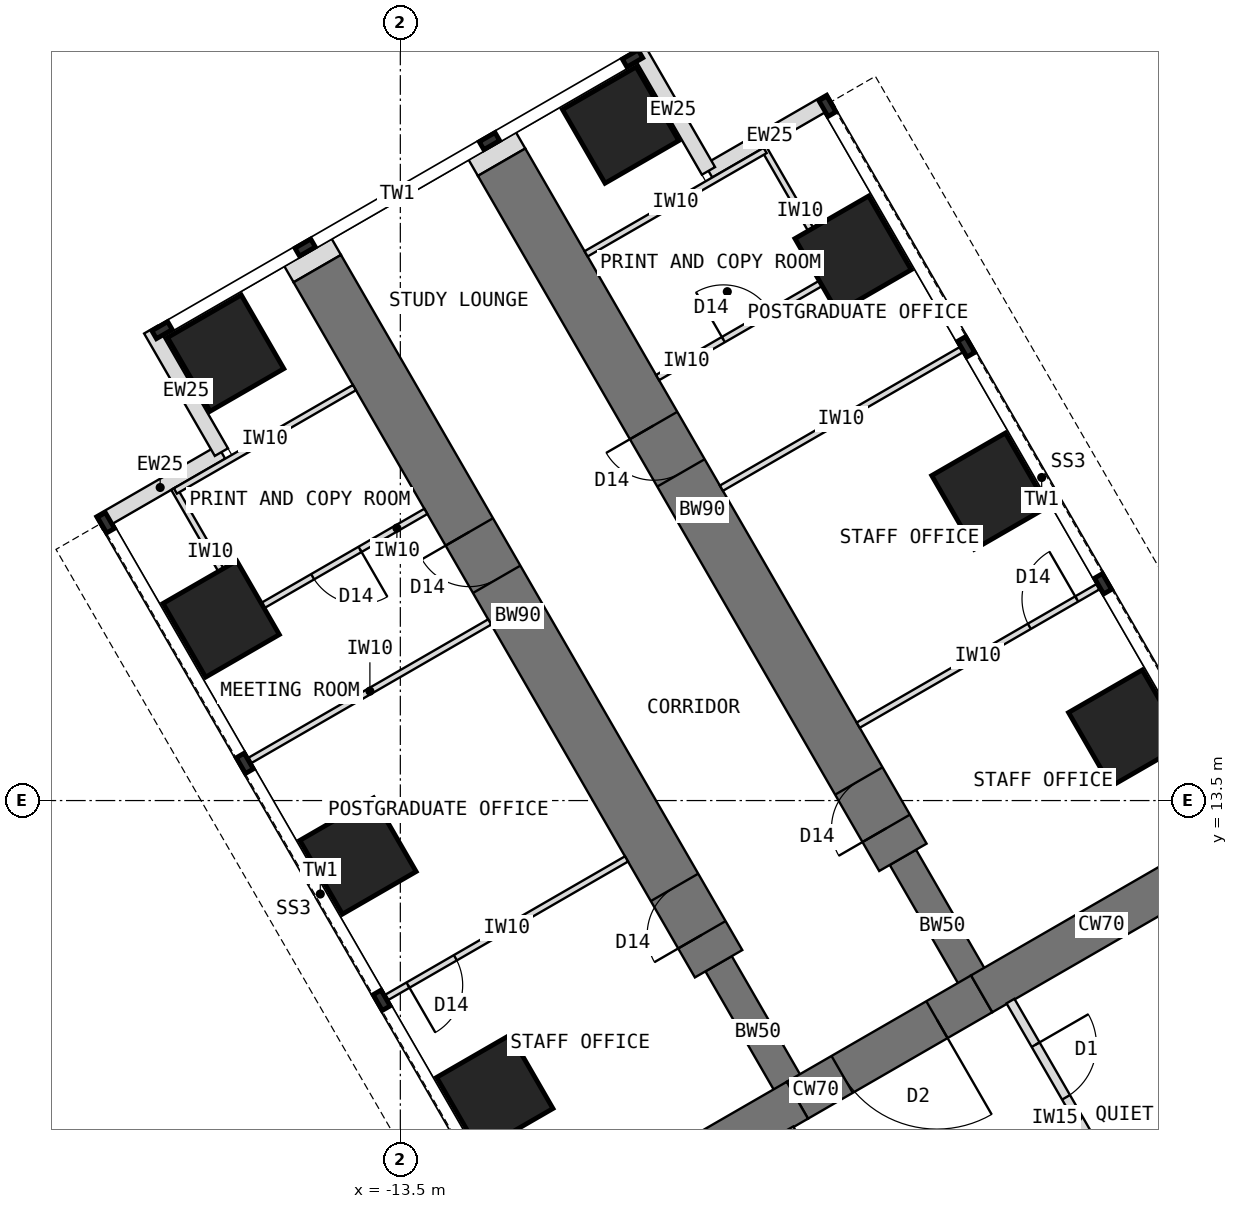
"""IFC4 building model, lengths in metres.
Left out: names, types, materials, properties, quantities, classifications, styles, units other than length and angle.
Written with IfcOpenShell. Run it as: python <this file> out.ifc"""

import sys

from ifc_helpers import new_model, si_unit, direction, frame, frame_2d, origin, origin_2d, place, context, subcontext, project, spatial, rectangle, extrude, element, fill, save


model = new_model("IFC4")
c1 = context("Model", 3, precision=1e-05, world=origin(), true_north=direction((0.0, 1.0)))
c2 = subcontext(c1, "Body", "Model", "MODEL_VIEW")
j1 = project(units=[si_unit("LENGTHUNIT", "METRE"), si_unit("PLANEANGLEUNIT", "RADIAN")], contexts=[c1])
p1 = place(None, origin())
s1 = spatial("IfcSite", under=j1, at=p1, CompositionType="ELEMENT")
p2 = place(p1, origin())
s2 = spatial("IfcBuilding", under=s1, at=p2, CompositionType="ELEMENT")
p3 = place(p2, frame((0.0, 0.0, 88.5)))
s3 = spatial("IfcBuildingStorey", under=s2, at=p3, CompositionType="ELEMENT", Elevation=88.5)
p4 = place(p3, frame((0.0, 12.596, 0.0), z_axis=(0.0, 0.0, 1.0), x_axis=(-0.866011268655, -0.500024481964, 0.0)))
e1 = element("IfcWall", 1, at=p4, inside=s3, PredefinedType="SHEAR", context=c2, shape_type="SweptSolid", body=[
    extrude(rectangle(XDim=4.548, YDim=0.7, at=frame_2d((2.274, 0.0))), origin(), (0.0, 0.0, 1.0), 4.0),
])
p5 = place(p3, frame((-3.939, 10.322, 0.0), z_axis=(0.0, 0.0, 1.0), x_axis=(-0.866019471182, -0.500010275428, 0.0)))
e2 = element("IfcWall", 2, at=p5, inside=s3, PredefinedType="SHEAR", context=c2, shape_type="SweptSolid", body=[
    extrude(rectangle(XDim=3.5, YDim=0.7, at=frame_2d((1.75, 0.0))), origin(), (0.0, 0.0, 1.0), 4.0),
])
p6 = place(p5, frame((0.85, 0.0, 0.0)))
e3 = element("IfcOpeningElement", 3, at=p6, cuts=e2, PredefinedType="OPENING", context=c2, shape_type="SweptSolid", body=[
    extrude(rectangle(XDim=1.8, YDim=2.1, at=frame_2d((0.9, 1.05))), frame((0.0, 0.36, 0.0), z_axis=(0.0, -1.0, 0.0), x_axis=(1.0, 0.0, 0.0)), (0.0, 0.0, 1.0), 0.72),
])
p7 = place(p3, frame((-6.97, 8.572, 0.0), z_axis=(0.0, 0.0, 1.0), x_axis=(-0.866034513004, -0.499984222037, 0.0)))
e4 = element("IfcWall", 4, at=p7, inside=s3, PredefinedType="SHEAR", context=c2, shape_type="SweptSolid", body=[
    extrude(rectangle(XDim=4.548, YDim=0.7, at=frame_2d((2.274, 0.0))), origin(), (0.0, 0.0, 1.0), 4.0),
])
p8 = place(p3, frame((-6.97, 8.572, 0.0), z_axis=(0.0, 0.0, 1.0), x_axis=(-0.499988811324, 0.866031863473, 0.0)))
e5 = element("IfcWall", 5, at=p8, inside=s3, PredefinedType="SHEAR", context=c2, shape_type="SweptSolid", body=[
    extrude(rectangle(XDim=2.592, YDim=0.5, at=frame_2d((1.296, 0.0))), origin(), (0.0, 0.0, 1.0), 4.0),
])
p9 = place(p3, frame((-8.266, 10.816, 0.0), z_axis=(0.0, 0.0, 1.0), x_axis=(-0.499996231654, 0.866027579429, 0.0)))
e6 = element("IfcWall", 6, at=p9, inside=s3, PredefinedType="SHEAR", context=c2, shape_type="SweptSolid", body=[
    extrude(rectangle(XDim=13.2, YDim=0.9, at=frame_2d((6.6, 0.0))), origin(), (0.0, 0.0, 1.0), 4.0),
])
p10 = place(p9, frame((0.55, 0.0, 0.0)))
e7 = element("IfcOpeningElement", 7, at=p10, cuts=e6, PredefinedType="OPENING", context=c2, shape_type="SweptSolid", body=[
    extrude(rectangle(XDim=0.9, YDim=2.1, at=frame_2d((0.45, 1.05))), frame((0.0, 0.46, 0.0), z_axis=(0.0, -1.0, 0.0), x_axis=(1.0, 0.0, 0.0)), (0.0, 0.0, 1.0), 0.92),
])
p11 = place(p9, frame((7.3, 0.0, 0.0)))
e8 = element("IfcOpeningElement", 8, at=p11, cuts=e6, PredefinedType="OPENING", context=c2, shape_type="SweptSolid", body=[
    extrude(rectangle(XDim=0.9, YDim=2.1, at=frame_2d((0.45, 1.05))), frame((0.0, 0.46, 0.0), z_axis=(0.0, -1.0, 0.0), x_axis=(1.0, 0.0, 0.0)), (0.0, 0.0, 1.0), 0.92),
])
p12 = place(p3, frame((-3.939, 10.322, 0.0), z_axis=(0.0, 0.0, 1.0), x_axis=(-0.499918158782, 0.866072649678, 0.0)))
e9 = element("IfcWall", 9, at=p12, inside=s3, PredefinedType="SHEAR", context=c2, shape_type="SweptSolid", body=[
    extrude(rectangle(XDim=2.592, YDim=0.5, at=frame_2d((1.296, 0.0))), origin(), (0.0, 0.0, 1.0), 4.0),
])
p13 = place(p3, frame((-5.234, 12.566, 0.0), z_axis=(0.0, 0.0, 1.0), x_axis=(-0.500010103361, 0.866019570528, 0.0)))
e10 = element("IfcWall", 10, at=p13, inside=s3, PredefinedType="SHEAR", context=c2, shape_type="SweptSolid", body=[
    extrude(rectangle(XDim=13.2, YDim=0.9, at=frame_2d((6.6, 0.0))), origin(), (0.0, 0.0, 1.0), 4.0),
])
p14 = place(p13, frame((0.55, 0.0, 0.0)))
e11 = element("IfcOpeningElement", 11, at=p14, cuts=e10, PredefinedType="OPENING", context=c2, shape_type="SweptSolid", body=[
    extrude(rectangle(XDim=0.9, YDim=2.1, at=frame_2d((0.45, 1.05))), frame((0.0, 0.46, 0.0), z_axis=(0.0, -1.0, 0.0), x_axis=(1.0, 0.0, 0.0)), (0.0, 0.0, 1.0), 0.92),
])
p15 = place(p13, frame((7.3, 0.0, 0.0)))
e12 = element("IfcOpeningElement", 12, at=p15, cuts=e10, PredefinedType="OPENING", context=c2, shape_type="SweptSolid", body=[
    extrude(rectangle(XDim=0.9, YDim=2.1, at=frame_2d((0.45, 1.05))), frame((0.0, 0.46, 0.0), z_axis=(0.0, -1.0, 0.0), x_axis=(1.0, 0.0, 0.0)), (0.0, 0.0, 1.0), 0.92),
])
for number, where, z_axis, x_axis in (
    (13, (-11.946, 8.691, 0.0), (0.0, 0.0, 1.0), (0.866, 0.5, 0.0)),
    (14, (-1.554, 14.691, 0.0), (0.0, 0.0, 1.0), (0.866, 0.5, 0.0)),
    (15, (-14.196, 12.588, 0.0), (0.0, 0.0, 1.0), (0.866, 0.5, 0.0)),
    (16, (-3.804, 18.588, 0.0), (0.0, 0.0, 1.0), (0.866, 0.5, 0.0)),
    (17, (-16.446, 16.486, 0.0), (0.0, 0.0, 1.0), (0.866, 0.5, 0.0)),
    (18, (-6.054, 22.486, 0.0), (0.0, 0.0, 1.0), (0.866, 0.5, 0.0)),
    (19, (-16.373, 20.858, 0.0), (0.0, 0.0, 1.0), (0.866, 0.5, 0.0)),
    (20, (-9.877, 24.608, 0.0), (0.0, 0.0, 1.0), (0.866, 0.5, 0.0)),
):
    element("IfcColumn", number, at=place(p3, frame(where, z_axis=z_axis, x_axis=x_axis)), inside=s3, PredefinedType="COLUMN", context=c2, shape_type="SweptSolid", body=[
        extrude(rectangle(XDim=1.4, YDim=1.4, at=origin_2d()), origin(), (0.0, 0.0, 1.0), 4.0),
    ])
for number, where, z_axis, x_axis in (
    (21, (-18.456, 18.067, 0.0), (0.0, 0.0, 1.0), (0.866, 0.5, 0.0)),
    (22, (-16.443, 19.23, 0.0), (0.0, 0.0, 1.0), (-0.5, 0.866, 0.0)),
    (23, (-6.419, 25.017, 0.0), (0.0, 0.0, 1.0), (-0.866, -0.5, 0.0)),
    (24, (-8.432, 23.855, 0.0), (0.0, 0.0, 1.0), (-0.5, 0.866, 0.0)),
):
    element("IfcWall", number, at=place(p3, frame(where, z_axis=z_axis, x_axis=x_axis)), inside=s3, PredefinedType="STANDARD", context=c2, shape_type="SweptSolid", body=[
        extrude(rectangle(XDim=2.325, YDim=0.25, at=frame_2d((1.163, 0.0))), origin(), (0.0, 0.0, 1.0), 3.7),
    ])
for number, where, z_axis, x_axis in (
    (25, (-14.865, 22.248, 0.0), (0.0, 0.0, 1.0), (-0.5, 0.866, 0.0)),
    (26, (-11.834, 23.998, 0.0), (0.0, 0.0, 1.0), (-0.5, 0.866, 0.0)),
):
    element("IfcWall", number, at=place(p3, frame(where, z_axis=z_axis, x_axis=x_axis)), inside=s3, PredefinedType="PARTITIONING", context=c2, shape_type="SweptSolid", body=[
        extrude(rectangle(XDim=0.31, YDim=0.9, at=frame_2d((0.155, 0.0))), origin(), (0.0, 0.0, 1.0), 3.7),
    ])
p16 = place(p3, frame((-1.201, 6.12, 0.0), z_axis=(0.0, 0.0, 1.0), x_axis=(0.500002627198, 0.866023886965, 0.0)))
e27 = element("IfcWall", 27, at=p16, inside=s3, PredefinedType="SHEAR", context=c2, shape_type="SweptSolid", body=[
    extrude(rectangle(XDim=5.858, YDim=0.4, at=frame_2d((2.929, 0.0))), origin(), (0.0, 0.0, 1.0), 4.0),
])
p17 = place(p3, frame((-9.78, 12.54, 0.0), z_axis=(0.0, 0.0, 1.0), x_axis=(-0.866035472144, -0.499982560684, 0.0)))
e28 = element("IfcWall", 28, at=p17, inside=s3, PredefinedType="PARTITIONING", context=c2, shape_type="SweptSolid", body=[
    extrude(rectangle(XDim=4.55, YDim=0.1, at=frame_2d((2.275, 0.0))), origin(), (0.0, 0.0, 1.0), 3.7),
])
p18 = place(p17, frame((3.25, 0.0, 0.0)))
e29 = element("IfcOpeningElement", 29, at=p18, cuts=e28, PredefinedType="OPENING", context=c2, shape_type="SweptSolid", body=[
    extrude(rectangle(XDim=0.9, YDim=2.1, at=frame_2d((0.45, 1.05))), frame((0.0, 0.06, 0.0), z_axis=(0.0, -1.0, 0.0), x_axis=(1.0, 0.0, 0.0)), (0.0, 0.0, 1.0), 0.12),
])
p19 = place(p3, frame((-12.03, 16.437, 0.0), z_axis=(0.0, 0.0, 1.0), x_axis=(-0.866035472144, -0.499982560684, 0.0)))
e30 = element("IfcWall", 30, at=p19, inside=s3, PredefinedType="PARTITIONING", context=c2, shape_type="SweptSolid", body=[
    extrude(rectangle(XDim=4.55, YDim=0.1, at=frame_2d((2.275, 0.0))), origin(), (0.0, 0.0, 1.0), 3.7),
])
p20 = place(p3, frame((-16.025, 16.556, 0.0), z_axis=(0.0, 0.0, 1.0), x_axis=(-0.500077600433, 0.865980596518, 0.0)))
e31 = element("IfcWall", 31, at=p20, inside=s3, PredefinedType="PARTITIONING", context=c2, shape_type="SweptSolid", body=[
    extrude(rectangle(XDim=2.4, YDim=0.1, at=frame_2d((1.2, 0.0))), origin(), (0.0, 0.0, 1.0), 3.7),
])
p21 = place(p3, frame((-13.08, 18.256, 0.0), z_axis=(0.0, 0.0, 1.0), x_axis=(-0.866020560687, -0.500008388397, 0.0)))
e32 = element("IfcWall", 32, at=p21, inside=s3, PredefinedType="PARTITIONING", context=c2, shape_type="SweptSolid", body=[
    extrude(rectangle(XDim=3.4, YDim=0.1, at=frame_2d((1.7, 0.0))), origin(), (0.0, 0.0, 1.0), 3.7),
])
p22 = place(p21, frame((1.25, 0.0, 0.0)))
e33 = element("IfcOpeningElement", 33, at=p22, cuts=e32, PredefinedType="OPENING", context=c2, shape_type="SweptSolid", body=[
    extrude(rectangle(XDim=0.9, YDim=2.1, at=frame_2d((0.45, 1.05))), frame((0.0, 0.06, 0.0), z_axis=(0.0, -1.0, 0.0), x_axis=(1.0, 0.0, 0.0)), (0.0, 0.0, 1.0), 0.12),
])
p23 = place(p3, frame((-14.255, 20.291, 0.0), z_axis=(0.0, 0.0, 1.0), x_axis=(-0.866020560687, -0.500008388397, 0.0)))
e34 = element("IfcWall", 34, at=p23, inside=s3, PredefinedType="PARTITIONING", context=c2, shape_type="SweptSolid", body=[
    extrude(rectangle(XDim=3.4, YDim=0.1, at=frame_2d((1.7, 0.0))), origin(), (0.0, 0.0, 1.0), 3.7),
])
p24 = place(p3, frame((-5.97, 14.74, 0.0), z_axis=(0.0, 0.0, 1.0), x_axis=(0.866035472144, 0.499982560684, 0.0)))
e35 = element("IfcWall", 35, at=p24, inside=s3, PredefinedType="PARTITIONING", context=c2, shape_type="SweptSolid", body=[
    extrude(rectangle(XDim=4.55, YDim=0.1, at=frame_2d((2.275, 0.0))), origin(), (0.0, 0.0, 1.0), 3.7),
])
p25 = place(p24, frame((3.25, 0.0, 0.0)))
e36 = element("IfcOpeningElement", 36, at=p25, cuts=e35, PredefinedType="OPENING", context=c2, shape_type="SweptSolid", body=[
    extrude(rectangle(XDim=0.9, YDim=2.1, at=frame_2d((0.45, 1.05))), frame((0.0, 0.06, 0.0), z_axis=(0.0, -1.0, 0.0), x_axis=(1.0, 0.0, 0.0)), (0.0, 0.0, 1.0), 0.12),
])
p26 = place(p3, frame((-8.22, 18.637, 0.0), z_axis=(0.0, 0.0, 1.0), x_axis=(0.866012237902, 0.500022803284, 0.0)))
e37 = element("IfcWall", 37, at=p26, inside=s3, PredefinedType="PARTITIONING", context=c2, shape_type="SweptSolid", body=[
    extrude(rectangle(XDim=4.55, YDim=0.1, at=frame_2d((2.275, 0.0))), origin(), (0.0, 0.0, 1.0), 3.7),
])
p27 = place(p3, frame((-6.325, 22.156, 0.0), z_axis=(0.0, 0.0, 1.0), x_axis=(-0.500001309137, 0.866024647952, 0.0)))
e38 = element("IfcWall", 38, at=p27, inside=s3, PredefinedType="PARTITIONING", context=c2, shape_type="SweptSolid", body=[
    extrude(rectangle(XDim=2.4, YDim=0.1, at=frame_2d((1.2, 0.0))), origin(), (0.0, 0.0, 1.0), 3.7),
])
p28 = place(p3, frame((-9.27, 20.456, 0.0), z_axis=(0.0, 0.0, 1.0), x_axis=(0.866007419912, 0.500031147688, 0.0)))
e39 = element("IfcWall", 39, at=p28, inside=s3, PredefinedType="PARTITIONING", context=c2, shape_type="SweptSolid", body=[
    extrude(rectangle(XDim=3.4, YDim=0.1, at=frame_2d((1.7, 0.0))), origin(), (0.0, 0.0, 1.0), 3.7),
])
p29 = place(p28, frame((1.25, 0.0, 0.0)))
e40 = element("IfcOpeningElement", 40, at=p29, cuts=e39, PredefinedType="OPENING", context=c2, shape_type="SweptSolid", body=[
    extrude(rectangle(XDim=0.9, YDim=2.1, at=frame_2d((0.45, 1.05))), frame((0.0, 0.06, 0.0), z_axis=(0.0, -1.0, 0.0), x_axis=(1.0, 0.0, 0.0)), (0.0, 0.0, 1.0), 0.12),
])
p30 = place(p3, frame((-10.445, 22.491, 0.0), z_axis=(0.0, 0.0, 1.0), x_axis=(0.866007419912, 0.500031147688, 0.0)))
e41 = element("IfcWall", 41, at=p30, inside=s3, PredefinedType="PARTITIONING", context=c2, shape_type="SweptSolid", body=[
    extrude(rectangle(XDim=3.4, YDim=0.1, at=frame_2d((1.7, 0.0))), origin(), (0.0, 0.0, 1.0), 3.7),
])
p31 = place(p3, frame((-4.89, 4.27, 0.0), z_axis=(0.0, 0.0, 1.0), x_axis=(-0.500007369519, 0.866021148949, 0.0)))
e42 = element("IfcWall", 42, at=p31, inside=s3, PredefinedType="PARTITIONING", context=c2, shape_type="SweptSolid", body=[
    extrude(rectangle(XDim=4.426, YDim=0.15, at=frame_2d((2.213, 0.0))), origin(), (0.0, 0.0, 1.0), 3.7),
])
p32 = place(p31, frame((0.828, 0.0, 0.0)))
e43 = element("IfcOpeningElement", 43, at=p32, cuts=e42, PredefinedType="OPENING", context=c2, shape_type="SweptSolid", body=[
    extrude(rectangle(XDim=1.0, YDim=2.1, at=frame_2d((0.5, 1.05))), frame((0.0, 0.085, 0.0), z_axis=(0.0, -1.0, 0.0), x_axis=(1.0, 0.0, 0.0)), (0.0, 0.0, 1.0), 0.17),
])
p33 = place(p3, frame((-3.466, 10.202, 0.0), z_axis=(0.0, 0.0, 1.0), x_axis=(0.500007369519, -0.866021148949, 0.0)))
e44 = element("IfcWall", 44, at=p33, inside=s3, PredefinedType="PARTITIONING", context=c2, shape_type="SweptSolid", body=[
    extrude(rectangle(XDim=4.426, YDim=0.15, at=frame_2d((2.213, 0.0))), origin(), (0.0, 0.0, 1.0), 3.7),
])
p34 = place(p33, frame((0.828, 0.0, 0.0)))
e45 = element("IfcOpeningElement", 45, at=p34, cuts=e44, PredefinedType="OPENING", context=c2, shape_type="SweptSolid", body=[
    extrude(rectangle(XDim=1.0, YDim=2.1, at=frame_2d((0.5, 1.05))), frame((0.0, 0.085, 0.0), z_axis=(0.0, -1.0, 0.0), x_axis=(1.0, 0.0, 0.0)), (0.0, 0.0, 1.0), 0.17),
])
p35 = place(p6, origin())
e46 = element("IfcDoor", 46, at=p35, inside=s3, OperationType="DOUBLE_DOOR_DOUBLE_SWING", PredefinedType="DOOR", context=c2, shape_type="SweptSolid", body=[
    extrude(rectangle(XDim=1.72, YDim=2.06, at=frame_2d((0.9, 1.03))), frame((0.0, 0.025, 0.0), z_axis=(0.0, -1.0, 0.0), x_axis=(1.0, 0.0, 0.0)), (0.0, 0.0, 1.0), 0.05),
    extrude(rectangle(XDim=0.04, YDim=2.1, at=frame_2d((0.02, 1.05))), frame((0.0, 0.35, 0.0), z_axis=(0.0, -1.0, 0.0), x_axis=(1.0, 0.0, 0.0)), (0.0, 0.0, 1.0), 0.699),
    extrude(rectangle(XDim=0.04, YDim=2.1, at=frame_2d((1.78, 1.05))), frame((0.0, 0.35, 0.0), z_axis=(0.0, -1.0, 0.0), x_axis=(1.0, 0.0, 0.0)), (0.0, 0.0, 1.0), 0.699),
    extrude(rectangle(XDim=1.72, YDim=0.04, at=frame_2d((0.9, 2.08))), frame((0.0, 0.35, 0.0), z_axis=(0.0, -1.0, 0.0), x_axis=(1.0, 0.0, 0.0)), (0.0, 0.0, 1.0), 0.699),
])
fill(e3, e46)
p36 = place(p18, origin())
e47 = element("IfcDoor", 47, at=p36, inside=s3, OperationType="SINGLE_SWING_RIGHT", PredefinedType="DOOR", context=c2, shape_type="SweptSolid", body=[
    extrude(rectangle(XDim=0.9, YDim=2.1, at=frame_2d((0.45, 1.05))), frame((0.0, 0.025, 0.0), z_axis=(0.0, -1.0, 0.0), x_axis=(1.0, 0.0, 0.0)), (0.0, 0.0, 1.0), 0.05),
])
fill(e29, e47)
p37 = place(p22, origin())
e48 = element("IfcDoor", 48, at=p37, inside=s3, OperationType="SINGLE_SWING_LEFT", PredefinedType="DOOR", context=c2, shape_type="SweptSolid", body=[
    extrude(rectangle(XDim=0.9, YDim=2.1, at=frame_2d((0.45, 1.05))), frame((0.0, 0.025, 0.0), z_axis=(0.0, -1.0, 0.0), x_axis=(1.0, 0.0, 0.0)), (0.0, 0.0, 1.0), 0.05),
])
fill(e33, e48)
p38 = place(p25, origin())
e49 = element("IfcDoor", 49, at=p38, inside=s3, OperationType="SINGLE_SWING_RIGHT", PredefinedType="DOOR", context=c2, shape_type="SweptSolid", body=[
    extrude(rectangle(XDim=0.9, YDim=2.1, at=frame_2d((0.45, 1.05))), frame((0.0, 0.025, 0.0), z_axis=(0.0, -1.0, 0.0), x_axis=(1.0, 0.0, 0.0)), (0.0, 0.0, 1.0), 0.05),
])
fill(e36, e49)
p39 = place(p29, origin())
e50 = element("IfcDoor", 50, at=p39, inside=s3, OperationType="SINGLE_SWING_LEFT", PredefinedType="DOOR", context=c2, shape_type="SweptSolid", body=[
    extrude(rectangle(XDim=0.9, YDim=2.1, at=frame_2d((0.45, 1.05))), frame((0.0, 0.025, 0.0), z_axis=(0.0, -1.0, 0.0), x_axis=(1.0, 0.0, 0.0)), (0.0, 0.0, 1.0), 0.05),
])
fill(e40, e50)
p40 = place(p34, origin())
e51 = element("IfcDoor", 51, at=p40, inside=s3, OperationType="SINGLE_SWING_LEFT", PredefinedType="DOOR", context=c2, shape_type="SweptSolid", body=[
    extrude(rectangle(XDim=1.0, YDim=2.1, at=frame_2d((0.5, 1.05))), frame((0.0, 0.025, 0.0), z_axis=(0.0, -1.0, 0.0), x_axis=(1.0, 0.0, 0.0)), (0.0, 0.0, 1.0), 0.05),
])
fill(e45, e51)
p41 = place(p10, origin())
e52 = element("IfcDoor", 52, at=p41, inside=s3, OperationType="SINGLE_SWING_LEFT", PredefinedType="DOOR", context=c2, shape_type="SweptSolid", body=[
    extrude(rectangle(XDim=0.82, YDim=2.06, at=frame_2d((0.45, 1.03))), frame((0.0, 0.025, 0.0), z_axis=(0.0, -1.0, 0.0), x_axis=(1.0, 0.0, 0.0)), (0.0, 0.0, 1.0), 0.05),
    extrude(rectangle(XDim=0.04, YDim=2.1, at=frame_2d((0.02, 1.05))), frame((0.0, 0.45, 0.0), z_axis=(0.0, -1.0, 0.0), x_axis=(1.0, 0.0, 0.0)), (0.0, 0.0, 1.0), 0.899),
    extrude(rectangle(XDim=0.04, YDim=2.1, at=frame_2d((0.88, 1.05))), frame((0.0, 0.45, 0.0), z_axis=(0.0, -1.0, 0.0), x_axis=(1.0, 0.0, 0.0)), (0.0, 0.0, 1.0), 0.899),
    extrude(rectangle(XDim=0.82, YDim=0.04, at=frame_2d((0.45, 2.08))), frame((0.0, 0.45, 0.0), z_axis=(0.0, -1.0, 0.0), x_axis=(1.0, 0.0, 0.0)), (0.0, 0.0, 1.0), 0.899),
])
fill(e7, e52)
p42 = place(p11, origin())
e53 = element("IfcDoor", 53, at=p42, inside=s3, OperationType="SINGLE_SWING_RIGHT", PredefinedType="DOOR", context=c2, shape_type="SweptSolid", body=[
    extrude(rectangle(XDim=0.82, YDim=2.06, at=frame_2d((0.45, 1.03))), frame((0.0, 0.025, 0.0), z_axis=(0.0, -1.0, 0.0), x_axis=(1.0, 0.0, 0.0)), (0.0, 0.0, 1.0), 0.05),
    extrude(rectangle(XDim=0.04, YDim=2.1, at=frame_2d((0.02, 1.05))), frame((0.0, 0.45, 0.0), z_axis=(0.0, -1.0, 0.0), x_axis=(1.0, 0.0, 0.0)), (0.0, 0.0, 1.0), 0.899),
    extrude(rectangle(XDim=0.04, YDim=2.1, at=frame_2d((0.88, 1.05))), frame((0.0, 0.45, 0.0), z_axis=(0.0, -1.0, 0.0), x_axis=(1.0, 0.0, 0.0)), (0.0, 0.0, 1.0), 0.899),
    extrude(rectangle(XDim=0.82, YDim=0.04, at=frame_2d((0.45, 2.08))), frame((0.0, 0.45, 0.0), z_axis=(0.0, -1.0, 0.0), x_axis=(1.0, 0.0, 0.0)), (0.0, 0.0, 1.0), 0.899),
])
fill(e8, e53)
p43 = place(p14, origin())
e54 = element("IfcDoor", 54, at=p43, inside=s3, OperationType="SINGLE_SWING_LEFT", PredefinedType="DOOR", context=c2, shape_type="SweptSolid", body=[
    extrude(rectangle(XDim=0.82, YDim=2.06, at=frame_2d((0.45, 1.03))), frame((0.0, 0.025, 0.0), z_axis=(0.0, -1.0, 0.0), x_axis=(1.0, 0.0, 0.0)), (0.0, 0.0, 1.0), 0.05),
    extrude(rectangle(XDim=0.04, YDim=2.1, at=frame_2d((0.02, 1.05))), frame((0.0, 0.45, 0.0), z_axis=(0.0, -1.0, 0.0), x_axis=(1.0, 0.0, 0.0)), (0.0, 0.0, 1.0), 0.899),
    extrude(rectangle(XDim=0.04, YDim=2.1, at=frame_2d((0.88, 1.05))), frame((0.0, 0.45, 0.0), z_axis=(0.0, -1.0, 0.0), x_axis=(1.0, 0.0, 0.0)), (0.0, 0.0, 1.0), 0.899),
    extrude(rectangle(XDim=0.82, YDim=0.04, at=frame_2d((0.45, 2.08))), frame((0.0, 0.45, 0.0), z_axis=(0.0, -1.0, 0.0), x_axis=(1.0, 0.0, 0.0)), (0.0, 0.0, 1.0), 0.899),
])
fill(e11, e54)
p44 = place(p15, origin())
e55 = element("IfcDoor", 55, at=p44, inside=s3, OperationType="SINGLE_SWING_RIGHT", PredefinedType="DOOR", context=c2, shape_type="SweptSolid", body=[
    extrude(rectangle(XDim=0.82, YDim=2.06, at=frame_2d((0.45, 1.03))), frame((0.0, 0.025, 0.0), z_axis=(0.0, -1.0, 0.0), x_axis=(1.0, 0.0, 0.0)), (0.0, 0.0, 1.0), 0.05),
    extrude(rectangle(XDim=0.04, YDim=2.1, at=frame_2d((0.02, 1.05))), frame((0.0, 0.45, 0.0), z_axis=(0.0, -1.0, 0.0), x_axis=(1.0, 0.0, 0.0)), (0.0, 0.0, 1.0), 0.899),
    extrude(rectangle(XDim=0.04, YDim=2.1, at=frame_2d((0.88, 1.05))), frame((0.0, 0.45, 0.0), z_axis=(0.0, -1.0, 0.0), x_axis=(1.0, 0.0, 0.0)), (0.0, 0.0, 1.0), 0.899),
    extrude(rectangle(XDim=0.82, YDim=0.04, at=frame_2d((0.45, 2.08))), frame((0.0, 0.45, 0.0), z_axis=(0.0, -1.0, 0.0), x_axis=(1.0, 0.0, 0.0)), (0.0, 0.0, 1.0), 0.899),
])
fill(e12, e55)
save(model, sys.argv[1])
